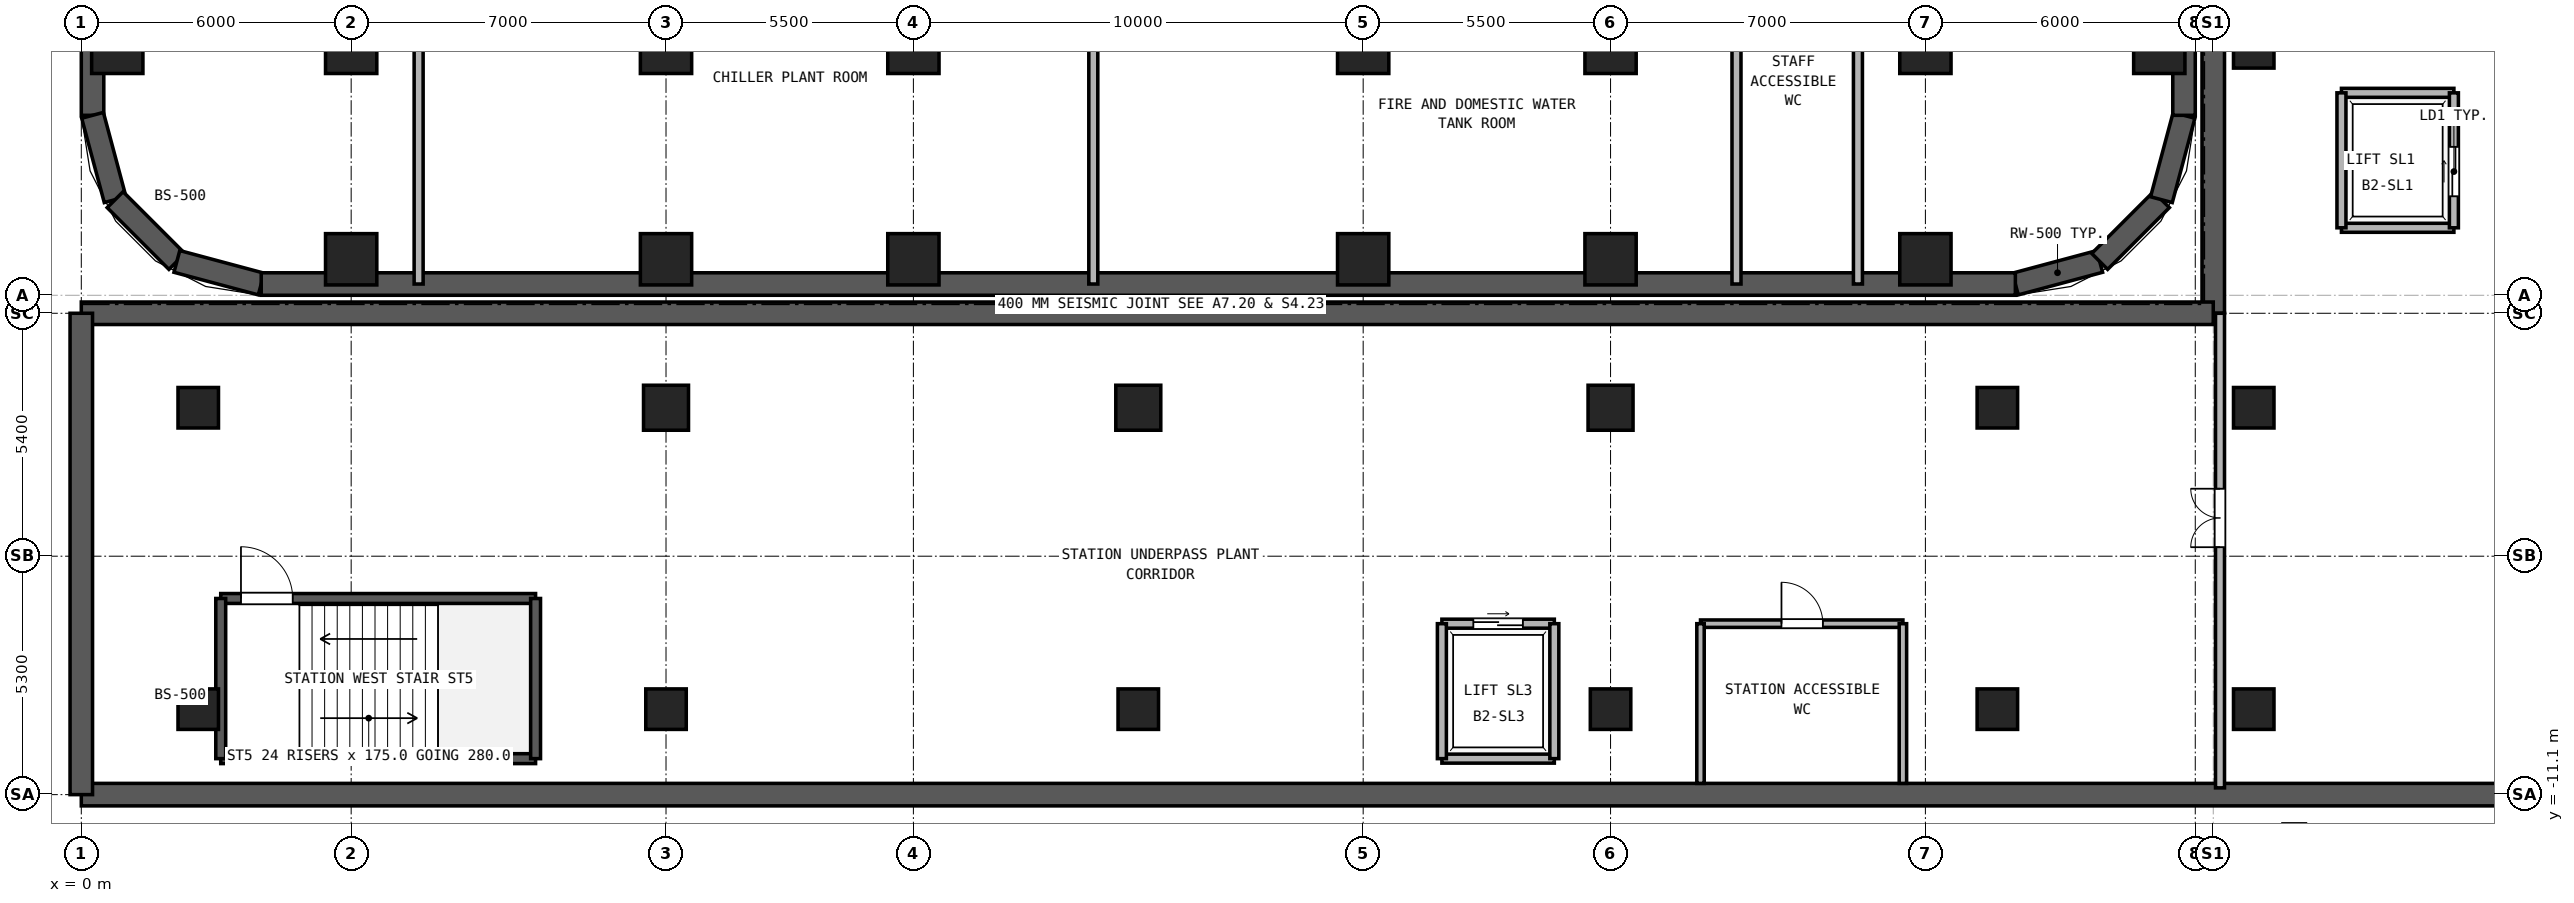
"""IFC4 building model, lengths in metres.
Left out: names, types, materials, properties, quantities, classifications, styles, units other than length and angle.
Written with IfcOpenShell. Run it as: python <this file> out.ifc"""

import sys

from ifc_helpers import new_model, si_unit, direction, frame, frame_2d, origin, origin_2d, place, context, subcontext, project, spatial, rectangle, hollow_rectangle, circle, extrude, source, transform, mapped, element, fill, save


model = new_model("IFC4")
c1 = context("Model", 3, precision=1e-05, world=origin(), true_north=direction((0.0, 1.0)))
c2 = subcontext(c1, "Body", "Model", "MODEL_VIEW")
j1 = project(units=[si_unit("LENGTHUNIT", "METRE"), si_unit("PLANEANGLEUNIT", "RADIAN")], contexts=[c1])
p1 = place(None, origin())
s1 = spatial("IfcSite", under=j1, at=p1, CompositionType="ELEMENT")
p2 = place(p1, origin())
s2 = spatial("IfcBuilding", under=s1, at=p2, CompositionType="ELEMENT")
p3 = place(p2, frame((0.0, 0.0, -8.4)))
s3 = spatial("IfcBuildingStorey", under=s2, at=p3, CompositionType="ELEMENT", Elevation=-8.4)
m1 = source(origin(), c2, "Body", "SweptSolid", [
    extrude(hollow_rectangle(XDim=1.14, YDim=1.14, WallThickness=0.07, at=origin_2d()), origin(), (0.0, 0.0, 1.0), 3.88),
])
for number, where, z_axis, x_axis in (
    (1, (6.0, 0.8, 0.0), (0.0, 0.0, 1.0), (1.0, 0.0, 0.0)),
    (2, (13.0, 0.8, 0.0), (0.0, 0.0, 1.0), (1.0, 0.0, 0.0)),
    (3, (18.5, 0.8, 0.0), (0.0, 0.0, 1.0), (1.0, 0.0, 0.0)),
    (4, (28.5, 0.8, 0.0), (0.0, 0.0, 1.0), (1.0, 0.0, 0.0)),
    (5, (34.0, 0.8, 0.0), (0.0, 0.0, 1.0), (1.0, 0.0, 0.0)),
    (6, (41.0, 0.8, 0.0), (0.0, 0.0, 1.0), (1.0, 0.0, 0.0)),
    (7, (0.8, 5.5, 0.0), (0.0, 0.0, 1.0), (1.0, 0.0, 0.0)),
    (8, (46.2, 5.5, 0.0), (0.0, 0.0, 1.0), (1.0, 0.0, 0.0)),
    (9, (6.0, 5.5, 0.0), (0.0, 0.0, 1.0), (1.0, 0.0, 0.0)),
    (10, (13.0, 5.5, 0.0), (0.0, 0.0, 1.0), (1.0, 0.0, 0.0)),
    (11, (18.5, 5.5, 0.0), (0.0, 0.0, 1.0), (1.0, 0.0, 0.0)),
    (12, (28.5, 5.5, 0.0), (0.0, 0.0, 1.0), (1.0, 0.0, 0.0)),
    (13, (34.0, 5.5, 0.0), (0.0, 0.0, 1.0), (1.0, 0.0, 0.0)),
    (14, (41.0, 5.5, 0.0), (0.0, 0.0, 1.0), (1.0, 0.0, 0.0)),
):
    element("IfcColumn", number, at=place(p3, frame(where, z_axis=z_axis, x_axis=x_axis)), inside=s3, PredefinedType="COLUMN", context=c2, shape_type="MappedRepresentation", body=[
        mapped(m1, transform((0.0, 0.0, 0.0), x_axis=(1.0, 0.0, 0.0), y_axis=(0.0, 1.0, 0.0), z_axis=(0.0, 0.0, 1.0), scale=1.0)),
    ])
m2 = source(origin(), c2, "Body", "SweptSolid", [
    extrude(hollow_rectangle(XDim=0.7, YDim=0.9, WallThickness=0.04, at=origin_2d()), origin(), (0.0, 0.0, 1.0), 3.88),
])
for number, where, z_axis, x_axis in (
    (15, (2.6, -9.2, 0.0), (0.0, 0.0, 1.0), (1.0, 0.0, 0.0)),
    (16, (2.6, -2.5, 0.0), (0.0, 0.0, 1.0), (1.0, 0.0, 0.0)),
    (17, (13.0, -9.2, 0.0), (0.0, 0.0, 1.0), (1.0, 0.0, 0.0)),
):
    element("IfcColumn", number, at=place(p3, frame(where, z_axis=z_axis, x_axis=x_axis)), inside=s3, PredefinedType="COLUMN", context=c2, shape_type="MappedRepresentation", body=[
        mapped(m2, transform((0.0, 0.0, 0.0), x_axis=(1.0, 0.0, 0.0), y_axis=(0.0, 1.0, 0.0), z_axis=(0.0, 0.0, 1.0), scale=1.0)),
    ])
m3 = source(origin(), c2, "Body", "SweptSolid", [
    extrude(circle(Radius=0.5, at=origin_2d()), origin(), (0.0, 0.0, 1.0), 3.88),
])
p4 = place(p3, frame((13.0, -2.5, 0.0), z_axis=(0.0, 0.0, 1.0), x_axis=(1.0, 0.0, 0.0)))
e18 = element("IfcColumn", 18, at=p4, inside=s3, PredefinedType="COLUMN", context=c2, shape_type="MappedRepresentation", body=[
    mapped(m3, transform((0.0, 0.0, 0.0), x_axis=(1.0, 0.0, 0.0), y_axis=(0.0, 1.0, 0.0), z_axis=(0.0, 0.0, 1.0), scale=1.0)),
])
p5 = place(p3, frame((23.5, -9.2, 0.0), z_axis=(0.0, 0.0, 1.0), x_axis=(1.0, 0.0, 0.0)))
e19 = element("IfcColumn", 19, at=p5, inside=s3, PredefinedType="COLUMN", context=c2, shape_type="MappedRepresentation", body=[
    mapped(m2, transform((0.0, 0.0, 0.0), x_axis=(1.0, 0.0, 0.0), y_axis=(0.0, 1.0, 0.0), z_axis=(0.0, 0.0, 1.0), scale=1.0)),
])
p6 = place(p3, frame((23.5, -2.5, 0.0), z_axis=(0.0, 0.0, 1.0), x_axis=(1.0, 0.0, 0.0)))
e20 = element("IfcColumn", 20, at=p6, inside=s3, PredefinedType="COLUMN", context=c2, shape_type="MappedRepresentation", body=[
    mapped(m3, transform((0.0, 0.0, 0.0), x_axis=(1.0, 0.0, 0.0), y_axis=(0.0, 1.0, 0.0), z_axis=(0.0, 0.0, 1.0), scale=1.0)),
])
p7 = place(p3, frame((34.0, -9.2, 0.0), z_axis=(0.0, 0.0, 1.0), x_axis=(1.0, 0.0, 0.0)))
e21 = element("IfcColumn", 21, at=p7, inside=s3, PredefinedType="COLUMN", context=c2, shape_type="MappedRepresentation", body=[
    mapped(m2, transform((0.0, 0.0, 0.0), x_axis=(1.0, 0.0, 0.0), y_axis=(0.0, 1.0, 0.0), z_axis=(0.0, 0.0, 1.0), scale=1.0)),
])
p8 = place(p3, frame((34.0, -2.5, 0.0), z_axis=(0.0, 0.0, 1.0), x_axis=(1.0, 0.0, 0.0)))
e22 = element("IfcColumn", 22, at=p8, inside=s3, PredefinedType="COLUMN", context=c2, shape_type="MappedRepresentation", body=[
    mapped(m3, transform((0.0, 0.0, 0.0), x_axis=(1.0, 0.0, 0.0), y_axis=(0.0, 1.0, 0.0), z_axis=(0.0, 0.0, 1.0), scale=1.0)),
])
for number, where, z_axis, x_axis in (
    (23, (42.6, -9.2, 0.0), (0.0, 0.0, 1.0), (1.0, 0.0, 0.0)),
    (24, (42.6, -2.5, 0.0), (0.0, 0.0, 1.0), (1.0, 0.0, 0.0)),
    (25, (48.3, -9.2, 0.0), (0.0, 0.0, 1.0), (1.0, 0.0, 0.0)),
    (26, (48.3, -2.5, 0.0), (0.0, 0.0, 1.0), (1.0, 0.0, 0.0)),
    (27, (48.3, 5.5, 0.0), (0.0, 0.0, 1.0), (1.0, 0.0, 0.0)),
):
    element("IfcColumn", number, at=place(p3, frame(where, z_axis=z_axis, x_axis=x_axis)), inside=s3, PredefinedType="COLUMN", context=c2, shape_type="MappedRepresentation", body=[
        mapped(m2, transform((0.0, 0.0, 0.0), x_axis=(1.0, 0.0, 0.0), y_axis=(0.0, 1.0, 0.0), z_axis=(0.0, 0.0, 1.0), scale=1.0)),
    ])
for number, where, z_axis, x_axis in (
    (28, (43.0, 0.25, 0.0), (0.0, 0.0, 1.0), (0.966, 0.259, 0.0)),
    (29, (44.875, 0.752, 0.0), (0.0, 0.0, 1.0), (0.707, 0.707, 0.0)),
    (30, (46.248, 2.125, 0.0), (0.0, 0.0, 1.0), (0.259, 0.966, 0.0)),
):
    element("IfcWall", number, at=place(p3, frame(where, z_axis=z_axis, x_axis=x_axis)), inside=s3, PredefinedType="USERDEFINED", context=c2, shape_type="SweptSolid", body=[
        extrude(rectangle(XDim=1.941, YDim=0.5, at=frame_2d((0.971, 0.0))), origin(), (0.0, 0.0, 1.0), 3.88),
    ])
for number, where, z_axis, x_axis in (
    (31, (46.75, 4.0, 0.0), (0.0, 0.0, 1.0), (0.0, 1.0, 0.0)),
    (32, (0.25, 36.5, 0.0), (0.0, 0.0, 1.0), (0.0, -1.0, 0.0)),
):
    element("IfcWall", number, at=place(p3, frame(where, z_axis=z_axis, x_axis=x_axis)), inside=s3, PredefinedType="USERDEFINED", context=c2, shape_type="SweptSolid", body=[
        extrude(rectangle(XDim=32.5, YDim=0.5, at=frame_2d((16.25, 0.0))), origin(), (0.0, 0.0, 1.0), 3.88),
    ])
for number, where, z_axis, x_axis in (
    (33, (0.25, 4.0, 0.0), (0.0, 0.0, 1.0), (0.259, -0.966, 0.0)),
    (34, (0.752, 2.125, 0.0), (0.0, 0.0, 1.0), (0.707, -0.707, 0.0)),
    (35, (2.125, 0.752, 0.0), (0.0, 0.0, 1.0), (0.966, -0.259, 0.0)),
):
    element("IfcWall", number, at=place(p3, frame(where, z_axis=z_axis, x_axis=x_axis)), inside=s3, PredefinedType="USERDEFINED", context=c2, shape_type="SweptSolid", body=[
        extrude(rectangle(XDim=1.941, YDim=0.5, at=frame_2d((0.971, 0.0))), origin(), (0.0, 0.0, 1.0), 3.88),
    ])
p9 = place(p3, frame((4.0, 0.25, 0.0), z_axis=(0.0, 0.0, 1.0), x_axis=(1.0, 0.0, 0.0)))
e36 = element("IfcWall", 36, at=p9, inside=s3, PredefinedType="USERDEFINED", context=c2, shape_type="SweptSolid", body=[
    extrude(rectangle(XDim=39.0, YDim=0.5, at=frame_2d((19.5, 0.0))), origin(), (0.0, 0.0, 1.0), 3.88),
])
p10 = place(p3, frame((0.0, -11.1, 0.0), z_axis=(0.0, 0.0, 1.0), x_axis=(1.0, 0.0, 0.0)))
e37 = element("IfcWall", 37, at=p10, inside=s3, PredefinedType="USERDEFINED", context=c2, shape_type="SweptSolid", body=[
    extrude(rectangle(XDim=71.6, YDim=0.5, at=frame_2d((35.8, 0.0))), origin(), (0.0, 0.0, 1.0), 3.88),
])
p11 = place(p3, frame((47.4, 40.5, 0.0), z_axis=(0.0, 0.0, 1.0), x_axis=(0.0, -1.0, 0.0)))
e38 = element("IfcWall", 38, at=p11, inside=s3, PredefinedType="USERDEFINED", context=c2, shape_type="SweptSolid", body=[
    extrude(rectangle(XDim=40.9, YDim=0.5, at=frame_2d((20.45, 0.0))), origin(), (0.0, 0.0, 1.0), 3.88),
])
p12 = place(p3, frame((47.4, -0.4, 0.0), z_axis=(0.0, 0.0, 1.0), x_axis=(-1.0, 0.0, 0.0)))
e39 = element("IfcWall", 39, at=p12, inside=s3, PredefinedType="USERDEFINED", context=c2, shape_type="SweptSolid", body=[
    extrude(rectangle(XDim=47.4, YDim=0.5, at=frame_2d((23.7, 0.0))), origin(), (0.0, 0.0, 1.0), 3.88),
])
p13 = place(p3, frame((0.0, -0.4, 0.0), z_axis=(0.0, 0.0, 1.0), x_axis=(0.0, -1.0, 0.0)))
e40 = element("IfcWall", 40, at=p13, inside=s3, PredefinedType="USERDEFINED", context=c2, shape_type="SweptSolid", body=[
    extrude(rectangle(XDim=10.7, YDim=0.5, at=frame_2d((5.35, 0.0))), origin(), (0.0, 0.0, 1.0), 3.88),
])
p14 = place(p3, frame((7.5, 0.25, 0.0), z_axis=(0.0, 0.0, 1.0), x_axis=(0.0, 1.0, 0.0)))
e41 = element("IfcWall", 41, at=p14, inside=s3, PredefinedType="PARTITIONING", context=c2, shape_type="SweptSolid", body=[
    extrude(rectangle(XDim=10.75, YDim=0.2, at=frame_2d((5.375, 0.0))), origin(), (0.0, 0.0, 1.0), 3.88),
])
p15 = place(p14, frame((9.2, 0.0, 0.0)))
e42 = element("IfcOpeningElement", 42, at=p15, cuts=e41, PredefinedType="OPENING", context=c2, shape_type="SweptSolid", body=[
    extrude(rectangle(XDim=1.05, YDim=2.15, at=frame_2d((0.525, 1.075))), frame((0.0, 0.11, 0.0), z_axis=(0.0, -1.0, 0.0), x_axis=(1.0, 0.0, 0.0)), (0.0, 0.0, 1.0), 0.22),
])
p16 = place(p3, frame((39.5, 0.25, 0.0), z_axis=(0.0, 0.0, 1.0), x_axis=(0.0, 1.0, 0.0)))
e43 = element("IfcWall", 43, at=p16, inside=s3, PredefinedType="PARTITIONING", context=c2, shape_type="SweptSolid", body=[
    extrude(rectangle(XDim=10.75, YDim=0.2, at=frame_2d((5.375, 0.0))), origin(), (0.0, 0.0, 1.0), 3.88),
])
p17 = place(p16, frame((9.2, 0.0, 0.0)))
e44 = element("IfcOpeningElement", 44, at=p17, cuts=e43, PredefinedType="OPENING", context=c2, shape_type="SweptSolid", body=[
    extrude(rectangle(XDim=1.05, YDim=2.15, at=frame_2d((0.525, 1.075))), frame((0.0, 0.11, 0.0), z_axis=(0.0, -1.0, 0.0), x_axis=(1.0, 0.0, 0.0)), (0.0, 0.0, 1.0), 0.22),
])
for number, where, z_axis, x_axis in (
    (45, (22.5, 0.25, 0.0), (0.0, 0.0, 1.0), (0.0, 1.0, 0.0)),
    (46, (36.8, 0.25, 0.0), (0.0, 0.0, 1.0), (0.0, 1.0, 0.0)),
):
    element("IfcWall", number, at=place(p3, frame(where, z_axis=z_axis, x_axis=x_axis)), inside=s3, PredefinedType="PARTITIONING", context=c2, shape_type="SweptSolid", body=[
        extrude(rectangle(XDim=8.65, YDim=0.2, at=frame_2d((4.325, 0.0))), origin(), (0.0, 0.0, 1.0), 3.88),
    ])
p18 = place(p3, frame((3.1, -10.3, 0.0), z_axis=(0.0, 0.0, 1.0), x_axis=(1.0, 0.0, 0.0)))
e47 = element("IfcWall", 47, at=p18, inside=s3, PredefinedType="SOLIDWALL", context=c2, shape_type="SweptSolid", body=[
    extrude(rectangle(XDim=7.0, YDim=0.22, at=frame_2d((3.5, 0.0))), origin(), (0.0, 0.0, 1.0), 3.88),
])
p19 = place(p3, frame((3.1, -6.74, 0.0), z_axis=(0.0, 0.0, 1.0), x_axis=(1.0, 0.0, 0.0)))
e48 = element("IfcWall", 48, at=p19, inside=s3, PredefinedType="SOLIDWALL", context=c2, shape_type="SweptSolid", body=[
    extrude(rectangle(XDim=7.0, YDim=0.22, at=frame_2d((3.5, 0.0))), origin(), (0.0, 0.0, 1.0), 3.88),
])
p20 = place(p19, frame((0.45, 0.0, 0.0)))
e49 = element("IfcOpeningElement", 49, at=p20, cuts=e48, PredefinedType="OPENING", context=c2, shape_type="SweptSolid", body=[
    extrude(rectangle(XDim=1.15, YDim=2.2, at=frame_2d((0.575, 1.1))), frame((0.0, 0.12, 0.0), z_axis=(0.0, -1.0, 0.0), x_axis=(1.0, 0.0, 0.0)), (0.0, 0.0, 1.0), 0.24),
])
for number, where, z_axis, x_axis in (
    (50, (3.1, -10.3, 0.0), (0.0, 0.0, 1.0), (0.0, 1.0, 0.0)),
    (51, (10.1, -10.3, 0.0), (0.0, 0.0, 1.0), (0.0, 1.0, 0.0)),
):
    element("IfcWall", number, at=place(p3, frame(where, z_axis=z_axis, x_axis=x_axis)), inside=s3, PredefinedType="SOLIDWALL", context=c2, shape_type="SweptSolid", body=[
        extrude(rectangle(XDim=3.56, YDim=0.22, at=frame_2d((1.78, 0.0))), origin(), (0.0, 0.0, 1.0), 3.88),
    ])
for number, where, z_axis, x_axis in (
    (52, (50.25, 1.5, 0.0), (0.0, 0.0, 1.0), (1.0, 0.0, 0.0)),
    (53, (50.25, 4.5, 0.0), (0.0, 0.0, 1.0), (1.0, 0.0, 0.0)),
):
    element("IfcWall", number, at=place(p3, frame(where, z_axis=z_axis, x_axis=x_axis)), inside=s3, PredefinedType="PARTITIONING", context=c2, shape_type="SweptSolid", body=[
        extrude(rectangle(XDim=2.5, YDim=0.2, at=frame_2d((1.25, 0.0))), origin(), (0.0, 0.0, 1.0), 3.88),
    ])
p21 = place(p3, frame((50.25, 1.5, 0.0), z_axis=(0.0, 0.0, 1.0), x_axis=(0.0, 1.0, 0.0)))
e54 = element("IfcWall", 54, at=p21, inside=s3, PredefinedType="PARTITIONING", context=c2, shape_type="SweptSolid", body=[
    extrude(rectangle(XDim=3.0, YDim=0.2, at=frame_2d((1.5, 0.0))), origin(), (0.0, 0.0, 1.0), 3.88),
])
p22 = place(p3, frame((52.75, 1.5, 0.0), z_axis=(0.0, 0.0, 1.0), x_axis=(0.0, 1.0, 0.0)))
e55 = element("IfcWall", 55, at=p22, inside=s3, PredefinedType="PARTITIONING", context=c2, shape_type="SweptSolid", body=[
    extrude(rectangle(XDim=3.0, YDim=0.2, at=frame_2d((1.5, 0.0))), origin(), (0.0, 0.0, 1.0), 3.88),
])
p23 = place(p22, frame((0.7, 0.0, 0.0)))
e56 = element("IfcOpeningElement", 56, at=p23, cuts=e55, PredefinedType="OPENING", context=c2, shape_type="SweptSolid", body=[
    extrude(rectangle(XDim=1.1, YDim=2.25, at=frame_2d((0.55, 1.125))), frame((0.0, 0.11, 0.0), z_axis=(0.0, -1.0, 0.0), x_axis=(1.0, 0.0, 0.0)), (0.0, 0.0, 1.0), 0.22),
])
p24 = place(p3, frame((30.25, -10.3, 0.0), z_axis=(0.0, 0.0, 1.0), x_axis=(1.0, 0.0, 0.0)))
e57 = element("IfcWall", 57, at=p24, inside=s3, PredefinedType="PARTITIONING", context=c2, shape_type="SweptSolid", body=[
    extrude(rectangle(XDim=2.5, YDim=0.2, at=frame_2d((1.25, 0.0))), origin(), (0.0, 0.0, 1.0), 3.88),
])
p25 = place(p3, frame((30.25, -7.3, 0.0), z_axis=(0.0, 0.0, 1.0), x_axis=(1.0, 0.0, 0.0)))
e58 = element("IfcWall", 58, at=p25, inside=s3, PredefinedType="PARTITIONING", context=c2, shape_type="SweptSolid", body=[
    extrude(rectangle(XDim=2.5, YDim=0.2, at=frame_2d((1.25, 0.0))), origin(), (0.0, 0.0, 1.0), 3.88),
])
p26 = place(p25, frame((0.7, 0.0, 0.0)))
e59 = element("IfcOpeningElement", 59, at=p26, cuts=e58, PredefinedType="OPENING", context=c2, shape_type="SweptSolid", body=[
    extrude(rectangle(XDim=1.1, YDim=2.25, at=frame_2d((0.55, 1.125))), frame((0.0, 0.11, 0.0), z_axis=(0.0, -1.0, 0.0), x_axis=(1.0, 0.0, 0.0)), (0.0, 0.0, 1.0), 0.22),
])
for number, where, z_axis, x_axis in (
    (60, (30.25, -10.3, 0.0), (0.0, 0.0, 1.0), (0.0, 1.0, 0.0)),
    (61, (32.75, -10.3, 0.0), (0.0, 0.0, 1.0), (0.0, 1.0, 0.0)),
):
    element("IfcWall", number, at=place(p3, frame(where, z_axis=z_axis, x_axis=x_axis)), inside=s3, PredefinedType="PARTITIONING", context=c2, shape_type="SweptSolid", body=[
        extrude(rectangle(XDim=3.0, YDim=0.2, at=frame_2d((1.5, 0.0))), origin(), (0.0, 0.0, 1.0), 3.88),
    ])
p27 = place(p3, frame((47.55, -10.95, 0.0), z_axis=(0.0, 0.0, 1.0), x_axis=(0.0, 1.0, 0.0)))
e62 = element("IfcWall", 62, at=p27, inside=s3, PredefinedType="PARTITIONING", context=c2, shape_type="SweptSolid", body=[
    extrude(rectangle(XDim=10.55, YDim=0.2, at=frame_2d((5.275, 0.0))), origin(), (0.0, 0.0, 1.0), 3.88),
])
p28 = place(p27, frame((5.35, 0.0, 0.0)))
e63 = element("IfcOpeningElement", 63, at=p28, cuts=e62, PredefinedType="OPENING", context=c2, shape_type="SweptSolid", body=[
    extrude(rectangle(XDim=1.3, YDim=2.2, at=frame_2d((0.65, 1.1))), frame((0.0, 0.11, 0.0), z_axis=(0.0, -1.0, 0.0), x_axis=(1.0, 0.0, 0.0)), (0.0, 0.0, 1.0), 0.22),
])
p29 = place(p3, frame((36.0, -7.3, 0.0), z_axis=(0.0, 0.0, 1.0), x_axis=(1.0, 0.0, 0.0)))
e64 = element("IfcWall", 64, at=p29, inside=s3, PredefinedType="PARTITIONING", context=c2, shape_type="SweptSolid", body=[
    extrude(rectangle(XDim=4.5, YDim=0.165, at=frame_2d((2.25, 0.0))), origin(), (0.0, 0.0, 1.0), 3.88),
])
p30 = place(p29, frame((1.8, 0.0, 0.0)))
e65 = element("IfcOpeningElement", 65, at=p30, cuts=e64, PredefinedType="OPENING", context=c2, shape_type="SweptSolid", body=[
    extrude(rectangle(XDim=0.92, YDim=2.1, at=frame_2d((0.46, 1.05))), frame((0.0, 0.093, 0.0), z_axis=(0.0, -1.0, 0.0), x_axis=(1.0, 0.0, 0.0)), (0.0, 0.0, 1.0), 0.185),
])
for number, where, z_axis, x_axis in (
    (66, (36.0, -10.85, 0.0), (0.0, 0.0, 1.0), (0.0, 1.0, 0.0)),
    (67, (40.5, -10.85, 0.0), (0.0, 0.0, 1.0), (0.0, 1.0, 0.0)),
):
    element("IfcWall", number, at=place(p3, frame(where, z_axis=z_axis, x_axis=x_axis)), inside=s3, PredefinedType="PARTITIONING", context=c2, shape_type="SweptSolid", body=[
        extrude(rectangle(XDim=3.55, YDim=0.165, at=frame_2d((1.775, 0.0))), origin(), (0.0, 0.0, 1.0), 3.88),
    ])
p31 = place(p20, origin())
e68 = element("IfcDoor", 68, at=p31, inside=s3, OperationType="SINGLE_SWING_LEFT", PredefinedType="DOOR", context=c2, shape_type="SweptSolid", body=[
    extrude(rectangle(XDim=1.15, YDim=2.2, at=frame_2d((0.575, 1.1))), frame((0.0, 0.025, 0.0), z_axis=(0.0, -1.0, 0.0), x_axis=(1.0, 0.0, 0.0)), (0.0, 0.0, 1.0), 0.05),
])
fill(e49, e68)
p32 = place(p23, origin())
e69 = element("IfcDoor", 69, at=p32, inside=s3, OperationType="DOUBLE_DOOR_SLIDING", PredefinedType="DOOR", context=c2, shape_type="SweptSolid", body=[
    extrude(rectangle(XDim=1.1, YDim=2.25, at=frame_2d((0.55, 1.125))), frame((0.0, 0.025, 0.0), z_axis=(0.0, -1.0, 0.0), x_axis=(1.0, 0.0, 0.0)), (0.0, 0.0, 1.0), 0.05),
])
fill(e56, e69)
p33 = place(p26, origin())
e70 = element("IfcDoor", 70, at=p33, inside=s3, OperationType="DOUBLE_DOOR_SLIDING", PredefinedType="DOOR", context=c2, shape_type="SweptSolid", body=[
    extrude(rectangle(XDim=1.1, YDim=2.25, at=frame_2d((0.55, 1.125))), frame((0.0, 0.025, 0.0), z_axis=(0.0, -1.0, 0.0), x_axis=(1.0, 0.0, 0.0)), (0.0, 0.0, 1.0), 0.05),
])
fill(e59, e70)
p34 = place(p28, origin())
e71 = element("IfcDoor", 71, at=p34, inside=s3, OperationType="DOUBLE_DOOR_SINGLE_SWING", PredefinedType="DOOR", context=c2, shape_type="SweptSolid", body=[
    extrude(rectangle(XDim=1.3, YDim=2.2, at=frame_2d((0.65, 1.1))), frame((0.0, 0.025, 0.0), z_axis=(0.0, -1.0, 0.0), x_axis=(1.0, 0.0, 0.0)), (0.0, 0.0, 1.0), 0.05),
])
fill(e63, e71)
p35 = place(p30, origin())
e72 = element("IfcDoor", 72, at=p35, inside=s3, OperationType="SINGLE_SWING_LEFT", PredefinedType="DOOR", context=c2, shape_type="SweptSolid", body=[
    extrude(rectangle(XDim=0.92, YDim=2.1, at=frame_2d((0.46, 1.05))), frame((0.0, 0.025, 0.0), z_axis=(0.0, -1.0, 0.0), x_axis=(1.0, 0.0, 0.0)), (0.0, 0.0, 1.0), 0.05),
])
fill(e65, e72)
save(model, sys.argv[1])
